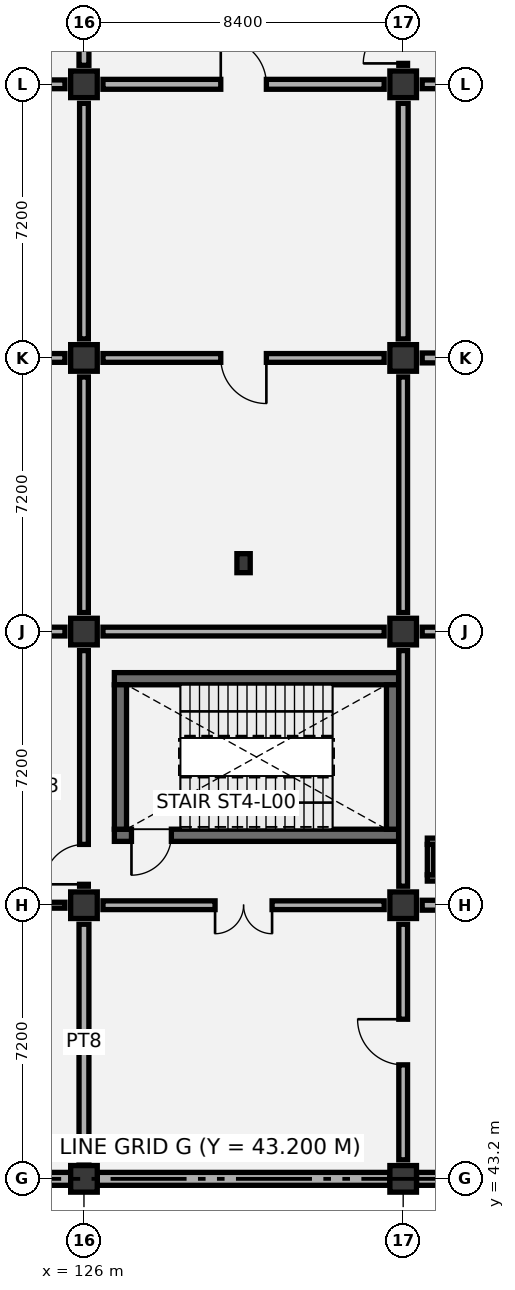
"""IFC4 building model, lengths in metres.
Left out: names, types, materials, properties, quantities, classifications, styles, units other than length and angle.
Written with IfcOpenShell. Run it as: python <this file> out.ifc"""

import sys

from ifc_helpers import new_model, si_unit, direction, frame, frame_2d, origin, origin_2d, place, context, subcontext, project, spatial, rectangle, extrude, element, fill, save


model = new_model("IFC4")
c1 = context("Model", 3, precision=1e-05, world=origin(), true_north=direction((0.0, 1.0)))
c2 = subcontext(c1, "Body", "Model", "MODEL_VIEW")
j1 = project(units=[si_unit("LENGTHUNIT", "METRE"), si_unit("PLANEANGLEUNIT", "RADIAN")], contexts=[c1])
p1 = place(None, origin())
s1 = spatial("IfcSite", under=j1, at=p1, CompositionType="ELEMENT")
p2 = place(p1, origin())
s2 = spatial("IfcBuilding", under=s1, at=p2, CompositionType="ELEMENT")
p3 = place(p2, origin())
s3 = spatial("IfcBuildingStorey", under=s2, at=p3, CompositionType="ELEMENT", Elevation=0.0)
for number, where, z_axis, x_axis in (
    (1, (126.0, 43.2, 0.0), (0.0, 0.0, 1.0), (1.0, 0.0, 0.0)),
    (2, (126.0, 50.4, 0.0), (0.0, 0.0, 1.0), (1.0, 0.0, 0.0)),
    (3, (126.0, 57.6, 0.0), (0.0, 0.0, 1.0), (1.0, 0.0, 0.0)),
    (4, (126.0, 64.8, 0.0), (0.0, 0.0, 1.0), (1.0, 0.0, 0.0)),
    (5, (126.0, 72.0, 0.0), (0.0, 0.0, 1.0), (1.0, 0.0, 0.0)),
    (6, (134.4, 43.2, 0.0), (0.0, 0.0, 1.0), (1.0, 0.0, 0.0)),
    (7, (134.4, 50.4, 0.0), (0.0, 0.0, 1.0), (1.0, 0.0, 0.0)),
    (8, (134.4, 57.6, 0.0), (0.0, 0.0, 1.0), (1.0, 0.0, 0.0)),
    (9, (134.4, 64.8, 0.0), (0.0, 0.0, 1.0), (1.0, 0.0, 0.0)),
    (10, (134.4, 72.0, 0.0), (0.0, 0.0, 1.0), (1.0, 0.0, 0.0)),
):
    element("IfcColumn", number, at=place(p3, frame(where, z_axis=z_axis, x_axis=x_axis)), inside=s3, PredefinedType="COLUMN", context=c2, shape_type="SweptSolid", body=[
        extrude(rectangle(XDim=0.7, YDim=0.7, at=origin_2d()), origin(), (0.0, 0.0, 1.0), 6.0),
    ])
p4 = place(p3, frame((130.2, 59.4, 0.0), z_axis=(0.0, 0.0, 1.0), x_axis=(1.0, 0.0, 0.0)))
e11 = element("IfcColumn", 11, at=p4, inside=s3, PredefinedType="PILASTER", context=c2, shape_type="SweptSolid", body=[
    extrude(rectangle(XDim=0.35, YDim=0.5, at=origin_2d()), origin(), (0.0, 0.0, 1.0), 6.0),
])
p5 = place(p3, frame((126.8, 52.24, 0.0), z_axis=(0.0, 0.0, 1.0), x_axis=(1.0, 0.0, 0.0)))
e12 = element("IfcWall", 12, at=p5, inside=s3, PredefinedType="SHEAR", context=c2, shape_type="SweptSolid", body=[
    extrude(rectangle(XDim=7.48, YDim=0.32, at=frame_2d((3.74, 0.0))), origin(), (0.0, 0.0, 1.0), 5.675),
])
p6 = place(p5, frame((0.45, 0.0, 0.0)))
e13 = element("IfcOpeningElement", 13, at=p6, cuts=e12, PredefinedType="OPENING", context=c2, shape_type="SweptSolid", body=[
    extrude(rectangle(XDim=1.05, YDim=2.15, at=frame_2d((0.525, 1.075))), frame((0.0, 0.17, 0.0), z_axis=(0.0, -1.0, 0.0), x_axis=(1.0, 0.0, 0.0)), (0.0, 0.0, 1.0), 0.34),
])
p7 = place(p3, frame((126.8, 56.36, 0.0), z_axis=(0.0, 0.0, 1.0), x_axis=(1.0, 0.0, 0.0)))
e14 = element("IfcWall", 14, at=p7, inside=s3, PredefinedType="SHEAR", context=c2, shape_type="SweptSolid", body=[
    extrude(rectangle(XDim=7.48, YDim=0.32, at=frame_2d((3.74, 0.0))), origin(), (0.0, 0.0, 1.0), 5.675),
])
for number, where, z_axis, x_axis in (
    (15, (126.96, 52.4, 0.0), (0.0, 0.0, 1.0), (0.0, 1.0, 0.0)),
    (16, (134.12, 52.4, 0.0), (0.0, 0.0, 1.0), (0.0, 1.0, 0.0)),
):
    element("IfcWall", number, at=place(p3, frame(where, z_axis=z_axis, x_axis=x_axis)), inside=s3, PredefinedType="SHEAR", context=c2, shape_type="SweptSolid", body=[
        extrude(rectangle(XDim=3.8, YDim=0.32, at=frame_2d((1.9, 0.0))), origin(), (0.0, 0.0, 1.0), 5.675),
    ])
p8 = place(p3, frame((118.05, 43.2, 0.0), z_axis=(0.0, 0.0, 1.0), x_axis=(1.0, 0.0, 0.0)))
e17 = element("IfcWall", 17, at=p8, inside=s3, PredefinedType="SOLIDWALL", context=c2, shape_type="SweptSolid", body=[
    extrude(rectangle(XDim=7.6, YDim=0.34, at=frame_2d((3.8, 0.0))), origin(), (0.0, 0.0, 1.0), 5.02),
])
for number, where, z_axis, x_axis in (
    (18, (126.35, 43.2, 0.0), (0.0, 0.0, 1.0), (1.0, 0.0, 0.0)),
    (19, (134.75, 43.2, 0.0), (0.0, 0.0, 1.0), (1.0, 0.0, 0.0)),
):
    element("IfcWall", number, at=place(p3, frame(where, z_axis=z_axis, x_axis=x_axis)), inside=s3, PredefinedType="SOLIDWALL", context=c2, shape_type="SweptSolid", body=[
        extrude(rectangle(XDim=7.7, YDim=0.34, at=frame_2d((3.85, 0.0))), origin(), (0.0, 0.0, 1.0), 5.02),
    ])
for number, where, z_axis, x_axis in (
    (20, (135.035, 51.117, 0.0), (0.0, 0.0, 1.0), (1.0, 0.0, 0.0)),
    (21, (135.035, 52.083, 0.0), (0.0, 0.0, 1.0), (1.0, 0.0, 0.0)),
):
    element("IfcWall", number, at=place(p3, frame(where, z_axis=z_axis, x_axis=x_axis)), inside=s3, PredefinedType="PARTITIONING", context=c2, shape_type="SweptSolid", body=[
        extrude(rectangle(XDim=1.43, YDim=0.165, at=frame_2d((0.715, 0.0))), origin(), (0.0, 0.0, 1.0), 5.675),
    ])
p9 = place(p3, frame((135.117, 51.2, 0.0), z_axis=(0.0, 0.0, 1.0), x_axis=(0.0, 1.0, 0.0)))
e22 = element("IfcWall", 22, at=p9, inside=s3, PredefinedType="PARTITIONING", context=c2, shape_type="SweptSolid", body=[
    extrude(rectangle(XDim=0.8, YDim=0.165, at=frame_2d((0.4, 0.0))), origin(), (0.0, 0.0, 1.0), 5.675),
])
p10 = place(p3, frame((126.0, 43.7, 0.0), z_axis=(0.0, 0.0, 1.0), x_axis=(0.0, 1.0, 0.0)))
e23 = element("IfcWall", 23, at=p10, inside=s3, PredefinedType="PARTITIONING", context=c2, shape_type="SweptSolid", body=[
    extrude(rectangle(XDim=6.2, YDim=0.26, at=frame_2d((3.1, 0.0))), origin(), (0.0, 0.0, 1.0), 4.92),
])
p11 = place(p3, frame((118.1, 50.4, 0.0), z_axis=(0.0, 0.0, 1.0), x_axis=(1.0, 0.0, 0.0)))
e24 = element("IfcWall", 24, at=p11, inside=s3, PredefinedType="PARTITIONING", context=c2, shape_type="SweptSolid", body=[
    extrude(rectangle(XDim=7.4, YDim=0.155, at=frame_2d((3.7, 0.0))), origin(), (0.0, 0.0, 1.0), 4.87),
])
p12 = place(p11, frame((3.125, 0.0, 0.0)))
e25 = element("IfcOpeningElement", 25, at=p12, cuts=e24, PredefinedType="OPENING", context=c2, shape_type="SweptSolid", body=[
    extrude(rectangle(XDim=1.15, YDim=2.1, at=frame_2d((0.575, 1.05))), frame((0.0, 0.087, 0.0), z_axis=(0.0, -1.0, 0.0), x_axis=(1.0, 0.0, 0.0)), (0.0, 0.0, 1.0), 0.175),
])
p13 = place(p3, frame((126.0, 50.9, 0.0), z_axis=(0.0, 0.0, 1.0), x_axis=(0.0, 1.0, 0.0)))
e26 = element("IfcWall", 26, at=p13, inside=s3, PredefinedType="PARTITIONING", context=c2, shape_type="SweptSolid", body=[
    extrude(rectangle(XDim=6.2, YDim=0.23, at=frame_2d((3.1, 0.0))), origin(), (0.0, 0.0, 1.0), 5.17),
])
p14 = place(p13, frame((0.05, 0.0, 0.0)))
e27 = element("IfcOpeningElement", 27, at=p14, cuts=e26, PredefinedType="OPENING", context=c2, shape_type="SweptSolid", body=[
    extrude(rectangle(XDim=1.05, YDim=2.15, at=frame_2d((0.525, 1.075))), frame((0.0, 0.125, 0.0), z_axis=(0.0, -1.0, 0.0), x_axis=(1.0, 0.0, 0.0)), (0.0, 0.0, 1.0), 0.25),
])
p15 = place(p3, frame((118.1, 57.6, 0.0), z_axis=(0.0, 0.0, 1.0), x_axis=(1.0, 0.0, 0.0)))
e28 = element("IfcWall", 28, at=p15, inside=s3, PredefinedType="PARTITIONING", context=c2, shape_type="SweptSolid", body=[
    extrude(rectangle(XDim=7.4, YDim=0.23, at=frame_2d((3.7, 0.0))), origin(), (0.0, 0.0, 1.0), 4.87),
])
p16 = place(p15, frame((2.95, 0.0, 0.0)))
e29 = element("IfcOpeningElement", 29, at=p16, cuts=e28, PredefinedType="OPENING", context=c2, shape_type="SweptSolid", body=[
    extrude(rectangle(XDim=1.5, YDim=2.15, at=frame_2d((0.75, 1.075))), frame((0.0, 0.125, 0.0), z_axis=(0.0, -1.0, 0.0), x_axis=(1.0, 0.0, 0.0)), (0.0, 0.0, 1.0), 0.25),
])
p17 = place(p3, frame((126.0, 58.1, 0.0), z_axis=(0.0, 0.0, 1.0), x_axis=(0.0, 1.0, 0.0)))
e30 = element("IfcWall", 30, at=p17, inside=s3, PredefinedType="PARTITIONING", context=c2, shape_type="SweptSolid", body=[
    extrude(rectangle(XDim=6.2, YDim=0.23, at=frame_2d((3.1, 0.0))), origin(), (0.0, 0.0, 1.0), 4.92),
])
p18 = place(p3, frame((118.1, 64.8, 0.0), z_axis=(0.0, 0.0, 1.0), x_axis=(1.0, 0.0, 0.0)))
e31 = element("IfcWall", 31, at=p18, inside=s3, PredefinedType="PARTITIONING", context=c2, shape_type="SweptSolid", body=[
    extrude(rectangle(XDim=7.4, YDim=0.23, at=frame_2d((3.7, 0.0))), origin(), (0.0, 0.0, 1.0), 4.87),
])
p19 = place(p3, frame((126.0, 65.3, 0.0), z_axis=(0.0, 0.0, 1.0), x_axis=(0.0, 1.0, 0.0)))
e32 = element("IfcWall", 32, at=p19, inside=s3, PredefinedType="PARTITIONING", context=c2, shape_type="SweptSolid", body=[
    extrude(rectangle(XDim=6.2, YDim=0.23, at=frame_2d((3.1, 0.0))), origin(), (0.0, 0.0, 1.0), 5.27),
])
p20 = place(p3, frame((118.1, 72.0, 0.0), z_axis=(0.0, 0.0, 1.0), x_axis=(1.0, 0.0, 0.0)))
e33 = element("IfcWall", 33, at=p20, inside=s3, PredefinedType="PARTITIONING", context=c2, shape_type="SweptSolid", body=[
    extrude(rectangle(XDim=7.4, YDim=0.23, at=frame_2d((3.7, 0.0))), origin(), (0.0, 0.0, 1.0), 4.87),
])
p21 = place(p3, frame((126.0, 72.5, 0.0), z_axis=(0.0, 0.0, 1.0), x_axis=(0.0, 1.0, 0.0)))
e34 = element("IfcWall", 34, at=p21, inside=s3, PredefinedType="PARTITIONING", context=c2, shape_type="SweptSolid", body=[
    extrude(rectangle(XDim=6.2, YDim=0.26, at=frame_2d((3.1, 0.0))), origin(), (0.0, 0.0, 1.0), 4.92),
])
p22 = place(p21, frame((2.5, 0.0, 0.0)))
e35 = element("IfcOpeningElement", 35, at=p22, cuts=e34, PredefinedType="OPENING", context=c2, shape_type="SweptSolid", body=[
    extrude(rectangle(XDim=1.2, YDim=2.1, at=frame_2d((0.6, 1.05))), frame((0.0, 0.14, 0.0), z_axis=(0.0, -1.0, 0.0), x_axis=(1.0, 0.0, 0.0)), (0.0, 0.0, 1.0), 0.28),
])
p23 = place(p3, frame((134.4, 43.7, 0.0), z_axis=(0.0, 0.0, 1.0), x_axis=(0.0, 1.0, 0.0)))
e36 = element("IfcWall", 36, at=p23, inside=s3, PredefinedType="PARTITIONING", context=c2, shape_type="SweptSolid", body=[
    extrude(rectangle(XDim=6.2, YDim=0.23, at=frame_2d((3.1, 0.0))), origin(), (0.0, 0.0, 1.0), 5.17),
])
p24 = place(p23, frame((2.5, 0.0, 0.0)))
e37 = element("IfcOpeningElement", 37, at=p24, cuts=e36, PredefinedType="OPENING", context=c2, shape_type="SweptSolid", body=[
    extrude(rectangle(XDim=1.2, YDim=2.1, at=frame_2d((0.6, 1.05))), frame((0.0, 0.125, 0.0), z_axis=(0.0, -1.0, 0.0), x_axis=(1.0, 0.0, 0.0)), (0.0, 0.0, 1.0), 0.25),
])
p25 = place(p3, frame((126.5, 50.4, 0.0), z_axis=(0.0, 0.0, 1.0), x_axis=(1.0, 0.0, 0.0)))
e38 = element("IfcWall", 38, at=p25, inside=s3, PredefinedType="PARTITIONING", context=c2, shape_type="SweptSolid", body=[
    extrude(rectangle(XDim=7.4, YDim=0.23, at=frame_2d((3.7, 0.0))), origin(), (0.0, 0.0, 1.0), 4.87),
])
p26 = place(p25, frame((2.95, 0.0, 0.0)))
e39 = element("IfcOpeningElement", 39, at=p26, cuts=e38, PredefinedType="OPENING", context=c2, shape_type="SweptSolid", body=[
    extrude(rectangle(XDim=1.5, YDim=2.15, at=frame_2d((0.75, 1.075))), frame((0.0, 0.125, 0.0), z_axis=(0.0, -1.0, 0.0), x_axis=(1.0, 0.0, 0.0)), (0.0, 0.0, 1.0), 0.25),
])
p27 = place(p3, frame((134.4, 50.9, 0.0), z_axis=(0.0, 0.0, 1.0), x_axis=(0.0, 1.0, 0.0)))
e40 = element("IfcWall", 40, at=p27, inside=s3, PredefinedType="PARTITIONING", context=c2, shape_type="SweptSolid", body=[
    extrude(rectangle(XDim=6.2, YDim=0.23, at=frame_2d((3.1, 0.0))), origin(), (0.0, 0.0, 1.0), 4.92),
])
p28 = place(p3, frame((126.5, 57.6, 0.0), z_axis=(0.0, 0.0, 1.0), x_axis=(1.0, 0.0, 0.0)))
e41 = element("IfcWall", 41, at=p28, inside=s3, PredefinedType="PARTITIONING", context=c2, shape_type="SweptSolid", body=[
    extrude(rectangle(XDim=7.4, YDim=0.23, at=frame_2d((3.7, 0.0))), origin(), (0.0, 0.0, 1.0), 4.87),
])
p29 = place(p3, frame((134.4, 58.1, 0.0), z_axis=(0.0, 0.0, 1.0), x_axis=(0.0, 1.0, 0.0)))
e42 = element("IfcWall", 42, at=p29, inside=s3, PredefinedType="PARTITIONING", context=c2, shape_type="SweptSolid", body=[
    extrude(rectangle(XDim=6.2, YDim=0.23, at=frame_2d((3.1, 0.0))), origin(), (0.0, 0.0, 1.0), 5.27),
])
p30 = place(p3, frame((126.5, 64.8, 0.0), z_axis=(0.0, 0.0, 1.0), x_axis=(1.0, 0.0, 0.0)))
e43 = element("IfcWall", 43, at=p30, inside=s3, PredefinedType="PARTITIONING", context=c2, shape_type="SweptSolid", body=[
    extrude(rectangle(XDim=7.4, YDim=0.23, at=frame_2d((3.7, 0.0))), origin(), (0.0, 0.0, 1.0), 4.87),
])
p31 = place(p30, frame((3.1, 0.0, 0.0)))
e44 = element("IfcOpeningElement", 44, at=p31, cuts=e43, PredefinedType="OPENING", context=c2, shape_type="SweptSolid", body=[
    extrude(rectangle(XDim=1.2, YDim=2.1, at=frame_2d((0.6, 1.05))), frame((0.0, 0.125, 0.0), z_axis=(0.0, -1.0, 0.0), x_axis=(1.0, 0.0, 0.0)), (0.0, 0.0, 1.0), 0.25),
])
p32 = place(p3, frame((134.4, 65.3, 0.0), z_axis=(0.0, 0.0, 1.0), x_axis=(0.0, 1.0, 0.0)))
e45 = element("IfcWall", 45, at=p32, inside=s3, PredefinedType="PARTITIONING", context=c2, shape_type="SweptSolid", body=[
    extrude(rectangle(XDim=6.2, YDim=0.26, at=frame_2d((3.1, 0.0))), origin(), (0.0, 0.0, 1.0), 4.92),
])
p33 = place(p3, frame((126.5, 72.0, 0.0), z_axis=(0.0, 0.0, 1.0), x_axis=(1.0, 0.0, 0.0)))
e46 = element("IfcWall", 46, at=p33, inside=s3, PredefinedType="PARTITIONING", context=c2, shape_type="SweptSolid", body=[
    extrude(rectangle(XDim=7.4, YDim=0.26, at=frame_2d((3.7, 0.0))), origin(), (0.0, 0.0, 1.0), 4.87),
])
p34 = place(p33, frame((3.1, 0.0, 0.0)))
e47 = element("IfcOpeningElement", 47, at=p34, cuts=e46, PredefinedType="OPENING", context=c2, shape_type="SweptSolid", body=[
    extrude(rectangle(XDim=1.2, YDim=2.1, at=frame_2d((0.6, 1.05))), frame((0.0, 0.14, 0.0), z_axis=(0.0, -1.0, 0.0), x_axis=(1.0, 0.0, 0.0)), (0.0, 0.0, 1.0), 0.28),
])
p35 = place(p3, frame((134.4, 72.5, 0.0), z_axis=(0.0, 0.0, 1.0), x_axis=(0.0, 1.0, 0.0)))
e48 = element("IfcWall", 48, at=p35, inside=s3, PredefinedType="PARTITIONING", context=c2, shape_type="SweptSolid", body=[
    extrude(rectangle(XDim=6.2, YDim=0.23, at=frame_2d((3.1, 0.0))), origin(), (0.0, 0.0, 1.0), 5.38),
])
p36 = place(p35, frame((0.05, 0.0, 0.0)))
e49 = element("IfcOpeningElement", 49, at=p36, cuts=e48, PredefinedType="OPENING", context=c2, shape_type="SweptSolid", body=[
    extrude(rectangle(XDim=1.05, YDim=2.15, at=frame_2d((0.525, 1.075))), frame((0.0, 0.125, 0.0), z_axis=(0.0, -1.0, 0.0), x_axis=(1.0, 0.0, 0.0)), (0.0, 0.0, 1.0), 0.25),
])
p37 = place(p3, frame((134.9, 50.4, 0.0), z_axis=(0.0, 0.0, 1.0), x_axis=(1.0, 0.0, 0.0)))
e50 = element("IfcWall", 50, at=p37, inside=s3, PredefinedType="PARTITIONING", context=c2, shape_type="SweptSolid", body=[
    extrude(rectangle(XDim=7.4, YDim=0.26, at=frame_2d((3.7, 0.0))), origin(), (0.0, 0.0, 1.0), 4.87),
])
p38 = place(p3, frame((134.9, 57.6, 0.0), z_axis=(0.0, 0.0, 1.0), x_axis=(1.0, 0.0, 0.0)))
e51 = element("IfcWall", 51, at=p38, inside=s3, PredefinedType="PARTITIONING", context=c2, shape_type="SweptSolid", body=[
    extrude(rectangle(XDim=7.4, YDim=0.23, at=frame_2d((3.7, 0.0))), origin(), (0.0, 0.0, 1.0), 4.87),
])
p39 = place(p38, frame((3.1, 0.0, 0.0)))
e52 = element("IfcOpeningElement", 52, at=p39, cuts=e51, PredefinedType="OPENING", context=c2, shape_type="SweptSolid", body=[
    extrude(rectangle(XDim=1.2, YDim=2.1, at=frame_2d((0.6, 1.05))), frame((0.0, 0.125, 0.0), z_axis=(0.0, -1.0, 0.0), x_axis=(1.0, 0.0, 0.0)), (0.0, 0.0, 1.0), 0.25),
])
p40 = place(p3, frame((134.9, 64.8, 0.0), z_axis=(0.0, 0.0, 1.0), x_axis=(1.0, 0.0, 0.0)))
e53 = element("IfcWall", 53, at=p40, inside=s3, PredefinedType="PARTITIONING", context=c2, shape_type="SweptSolid", body=[
    extrude(rectangle(XDim=7.4, YDim=0.26, at=frame_2d((3.7, 0.0))), origin(), (0.0, 0.0, 1.0), 4.87),
])
p41 = place(p40, frame((3.1, 0.0, 0.0)))
e54 = element("IfcOpeningElement", 54, at=p41, cuts=e53, PredefinedType="OPENING", context=c2, shape_type="SweptSolid", body=[
    extrude(rectangle(XDim=1.2, YDim=2.1, at=frame_2d((0.6, 1.05))), frame((0.0, 0.14, 0.0), z_axis=(0.0, -1.0, 0.0), x_axis=(1.0, 0.0, 0.0)), (0.0, 0.0, 1.0), 0.28),
])
p42 = place(p3, frame((134.9, 72.0, 0.0), z_axis=(0.0, 0.0, 1.0), x_axis=(1.0, 0.0, 0.0)))
e55 = element("IfcWall", 55, at=p42, inside=s3, PredefinedType="PARTITIONING", context=c2, shape_type="SweptSolid", body=[
    extrude(rectangle(XDim=7.4, YDim=0.23, at=frame_2d((3.7, 0.0))), origin(), (0.0, 0.0, 1.0), 4.87),
])
p43 = place(p42, frame((2.95, 0.0, 0.0)))
e56 = element("IfcOpeningElement", 56, at=p43, cuts=e55, PredefinedType="OPENING", context=c2, shape_type="SweptSolid", body=[
    extrude(rectangle(XDim=1.5, YDim=2.15, at=frame_2d((0.75, 1.075))), frame((0.0, 0.125, 0.0), z_axis=(0.0, -1.0, 0.0), x_axis=(1.0, 0.0, 0.0)), (0.0, 0.0, 1.0), 0.25),
])
p44 = place(p6, frame((1.05, 0.0, 0.0), z_axis=(0.0, 0.0, 1.0), x_axis=(-1.0, 0.0, 0.0)))
e57 = element("IfcDoor", 57, at=p44, inside=s3, OperationType="SINGLE_SWING_RIGHT", PredefinedType="DOOR", context=c2, shape_type="SweptSolid", body=[
    extrude(rectangle(XDim=1.05, YDim=2.15, at=frame_2d((0.525, 1.075))), frame((0.0, 0.025, 0.0), z_axis=(0.0, -1.0, 0.0), x_axis=(1.0, 0.0, 0.0)), (0.0, 0.0, 1.0), 0.05),
])
fill(e13, e57)
p45 = place(p14, origin())
e58 = element("IfcDoor", 58, at=p45, inside=s3, OperationType="SINGLE_SWING_LEFT", PredefinedType="DOOR", context=c2, shape_type="SweptSolid", body=[
    extrude(rectangle(XDim=1.05, YDim=2.15, at=frame_2d((0.525, 1.075))), frame((0.0, 0.025, 0.0), z_axis=(0.0, -1.0, 0.0), x_axis=(1.0, 0.0, 0.0)), (0.0, 0.0, 1.0), 0.05),
])
fill(e27, e58)
p46 = place(p24, origin())
e59 = element("IfcDoor", 59, at=p46, inside=s3, OperationType="SINGLE_SWING_RIGHT", PredefinedType="DOOR", context=c2, shape_type="SweptSolid", body=[
    extrude(rectangle(XDim=1.2, YDim=2.1, at=frame_2d((0.6, 1.05))), frame((0.0, 0.025, 0.0), z_axis=(0.0, -1.0, 0.0), x_axis=(1.0, 0.0, 0.0)), (0.0, 0.0, 1.0), 0.05),
])
fill(e37, e59)
p47 = place(p26, frame((1.5, 0.0, 0.0), z_axis=(0.0, 0.0, 1.0), x_axis=(-1.0, 0.0, 0.0)))
e60 = element("IfcDoor", 60, at=p47, inside=s3, OperationType="DOUBLE_DOOR_SINGLE_SWING", PredefinedType="DOOR", context=c2, shape_type="SweptSolid", body=[
    extrude(rectangle(XDim=1.5, YDim=2.15, at=frame_2d((0.75, 1.075))), frame((0.0, 0.025, 0.0), z_axis=(0.0, -1.0, 0.0), x_axis=(1.0, 0.0, 0.0)), (0.0, 0.0, 1.0), 0.05),
])
fill(e39, e60)
p48 = place(p31, frame((1.2, 0.0, 0.0), z_axis=(0.0, 0.0, 1.0), x_axis=(-1.0, 0.0, 0.0)))
e61 = element("IfcDoor", 61, at=p48, inside=s3, OperationType="SINGLE_SWING_LEFT", PredefinedType="DOOR", context=c2, shape_type="SweptSolid", body=[
    extrude(rectangle(XDim=1.2, YDim=2.1, at=frame_2d((0.6, 1.05))), frame((0.0, 0.025, 0.0), z_axis=(0.0, -1.0, 0.0), x_axis=(1.0, 0.0, 0.0)), (0.0, 0.0, 1.0), 0.05),
])
fill(e44, e61)
p49 = place(p34, origin())
e62 = element("IfcDoor", 62, at=p49, inside=s3, OperationType="SINGLE_SWING_LEFT", PredefinedType="DOOR", context=c2, shape_type="SweptSolid", body=[
    extrude(rectangle(XDim=1.2, YDim=2.1, at=frame_2d((0.6, 1.05))), frame((0.0, 0.025, 0.0), z_axis=(0.0, -1.0, 0.0), x_axis=(1.0, 0.0, 0.0)), (0.0, 0.0, 1.0), 0.05),
])
fill(e47, e62)
p50 = place(p36, origin())
e63 = element("IfcDoor", 63, at=p50, inside=s3, OperationType="SINGLE_SWING_LEFT", PredefinedType="DOOR", context=c2, shape_type="SweptSolid", body=[
    extrude(rectangle(XDim=1.05, YDim=2.15, at=frame_2d((0.525, 1.075))), frame((0.0, 0.025, 0.0), z_axis=(0.0, -1.0, 0.0), x_axis=(1.0, 0.0, 0.0)), (0.0, 0.0, 1.0), 0.05),
])
fill(e49, e63)
save(model, sys.argv[1])
